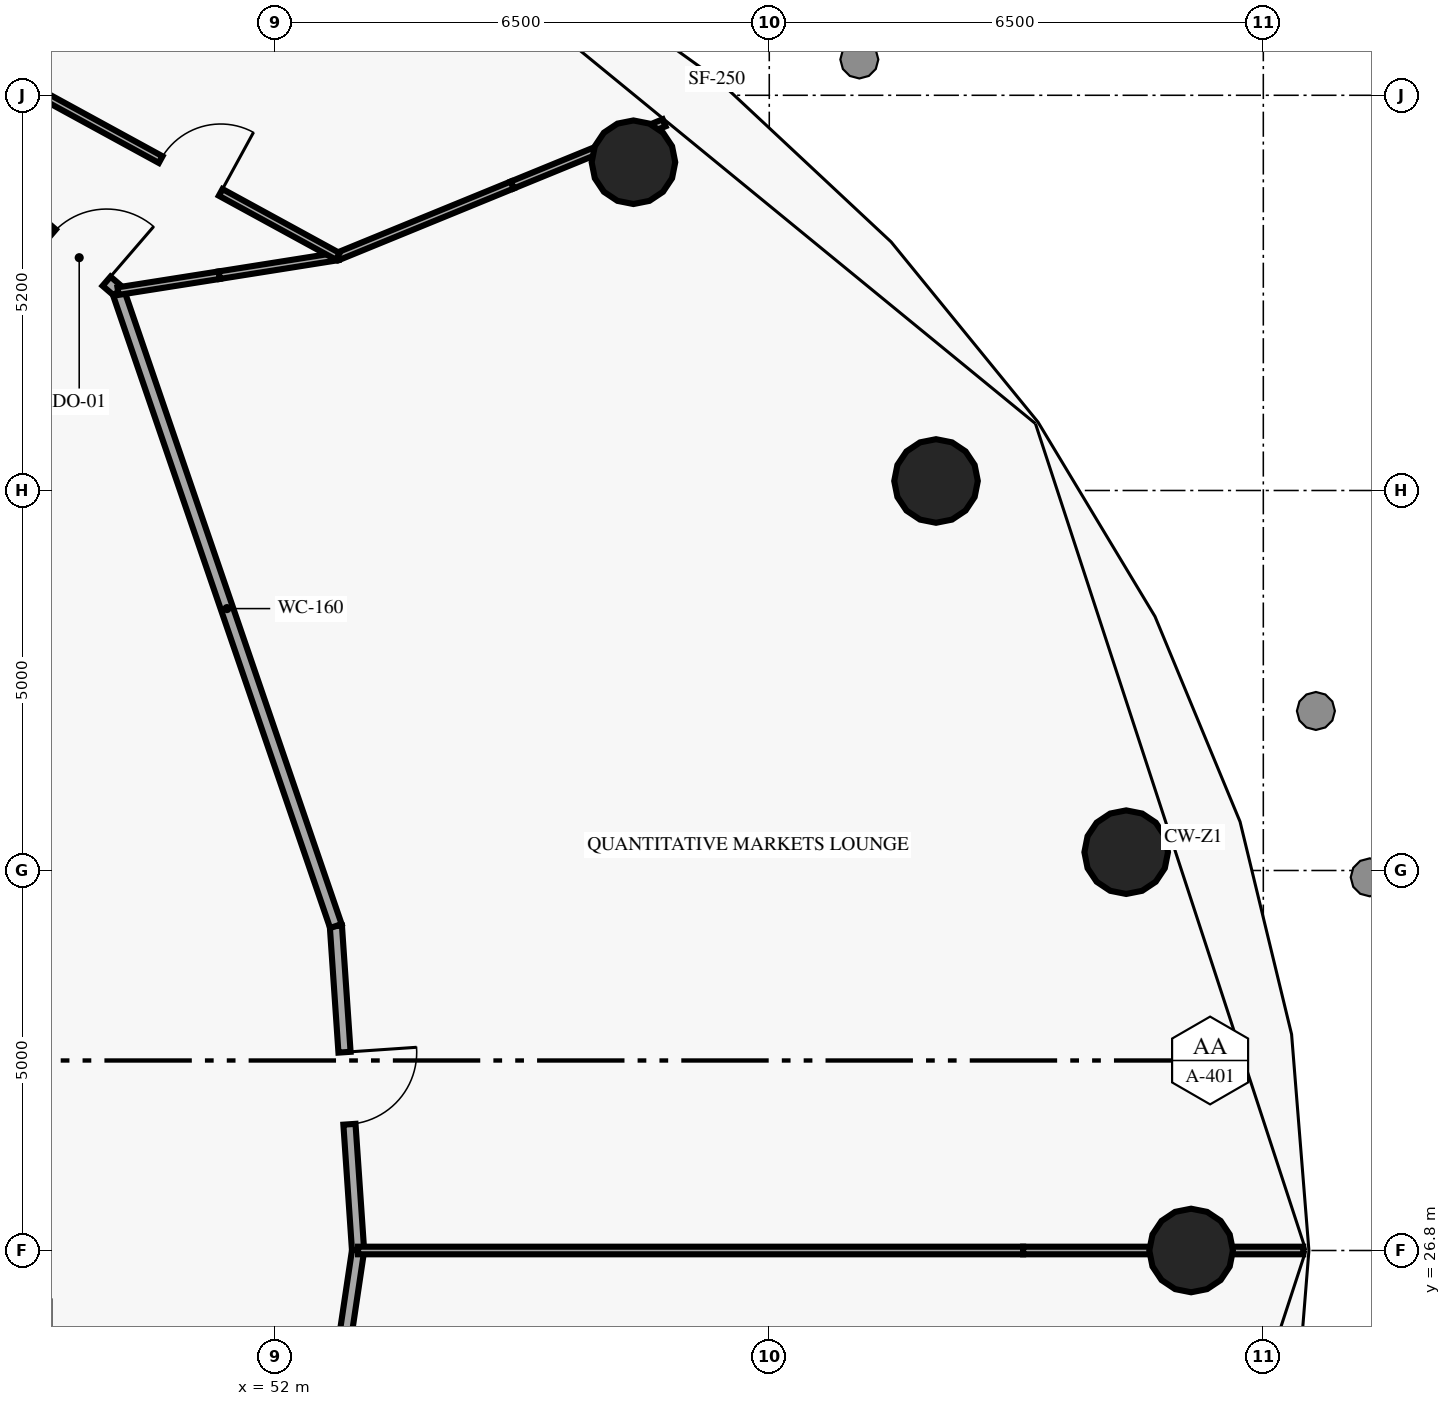
"""IFC4 building model, lengths in metres.
Left out: names, types, materials, properties, quantities, classifications, styles, units other than length and angle.
Written with IfcOpenShell. Run it as: python <this file> out.ifc"""

import sys

from ifc_helpers import new_model, si_unit, direction, frame, frame_2d, origin, origin_2d, place, context, subcontext, project, spatial, rectangle, circle, extrude, element, fill, save


model = new_model("IFC4")
c1 = context("Model", 3, precision=1e-05, world=origin(), true_north=direction((0.0, 1.0)))
c2 = subcontext(c1, "Body", "Model", "MODEL_VIEW")
j1 = project(units=[si_unit("LENGTHUNIT", "METRE"), si_unit("PLANEANGLEUNIT", "RADIAN")], contexts=[c1])
p1 = place(None, origin())
s1 = spatial("IfcSite", under=j1, at=p1, CompositionType="ELEMENT")
p2 = place(p1, origin())
s2 = spatial("IfcBuilding", under=s1, at=p2, CompositionType="ELEMENT")
p3 = place(p2, frame((0.0, 0.0, 65.55)))
s3 = spatial("IfcBuildingStorey", under=s2, at=p3, CompositionType="ELEMENT", Elevation=65.55)
for number, where, z_axis, x_axis in (
    (1, (64.05, 26.8, 0.0), (0.0, 0.0, 1.0), (1.0, 0.0, 0.0)),
    (2, (63.196, 32.041, 0.0), (0.0, 0.0, 1.0), (1.0, 0.0, 0.0)),
    (3, (60.694, 36.925, 0.0), (0.0, 0.0, 1.0), (1.0, 0.0, 0.0)),
    (4, (56.713, 41.119, 0.0), (0.0, 0.0, 1.0), (1.0, 0.0, 0.0)),
):
    element("IfcColumn", number, at=place(p3, frame(where, z_axis=z_axis, x_axis=x_axis)), inside=s3, PredefinedType="COLUMN", context=c2, shape_type="SweptSolid", body=[
        extrude(circle(Radius=0.55, at=origin_2d()), origin(), (0.0, 0.0, 1.0), 3.8),
    ])
p4 = place(p3, frame((52.798, 31.069, 0.0), z_axis=(0.0, 0.0, 1.0), x_axis=(0.068238144639, -0.99766906117, 0.0)))
e5 = element("IfcWall", 5, at=p4, inside=s3, PredefinedType="PARTITIONING", context=c2, shape_type="SweptSolid", body=[
    extrude(rectangle(XDim=4.279, YDim=0.16, at=frame_2d((2.14, 0.0))), origin(), (0.0, 0.0, 1.0), 3.8),
])
p5 = place(p4, frame((1.664, 0.0, 0.0)))
e6 = element("IfcOpeningElement", 6, at=p5, cuts=e5, PredefinedType="OPENING", context=c2, shape_type="SweptSolid", body=[
    extrude(rectangle(XDim=0.95, YDim=2.15, at=frame_2d((0.475, 1.075))), frame((0.0, 0.09, 0.0), z_axis=(0.0, -1.0, 0.0), x_axis=(1.0, 0.0, 0.0)), (0.0, 0.0, 1.0), 0.18),
])
p6 = place(p3, frame((52.798, 31.069, 0.0), z_axis=(0.0, 0.0, 1.0), x_axis=(-0.32452502426, 0.945877110744, 0.0)))
e7 = element("IfcWall", 7, at=p6, inside=s3, PredefinedType="PARTITIONING", context=c2, shape_type="SweptSolid", body=[
    extrude(rectangle(XDim=8.832, YDim=0.16, at=frame_2d((4.416, 0.0))), origin(), (0.0, 0.0, 1.0), 3.8),
])
p7 = place(p3, frame((46.703, 42.204, 0.0), z_axis=(0.0, 0.0, 1.0), x_axis=(0.757713718274, -0.652587098508, 0.0)))
e8 = element("IfcWall", 8, at=p7, inside=s3, PredefinedType="PARTITIONING", context=c2, shape_type="SweptSolid", body=[
    extrude(rectangle(XDim=4.261, YDim=0.16, at=frame_2d((2.131, 0.0))), origin(), (0.0, 0.0, 1.0), 3.8),
])
p8 = place(p7, frame((3.112, 0.0, 0.0)))
e9 = element("IfcOpeningElement", 9, at=p8, cuts=e8, PredefinedType="OPENING", context=c2, shape_type="SweptSolid", body=[
    extrude(rectangle(XDim=0.95, YDim=2.15, at=frame_2d((0.475, 1.075))), frame((0.0, 0.09, 0.0), z_axis=(0.0, -1.0, 0.0), x_axis=(1.0, 0.0, 0.0)), (0.0, 0.0, 1.0), 0.18),
])
p9 = place(p3, frame((51.818, 18.255, 0.0), z_axis=(0.0, 0.0, 1.0), x_axis=(0.147230717418, 0.989102176647, 0.0)))
e10 = element("IfcWall", 10, at=p9, inside=s3, PredefinedType="PARTITIONING", context=c2, shape_type="SweptSolid", body=[
    extrude(rectangle(XDim=8.639, YDim=0.16, at=frame_2d((4.32, 0.0))), origin(), (0.0, 0.0, 1.0), 3.8),
])
p10 = place(p3, frame((53.09, 26.8, 0.0), z_axis=(0.0, 0.0, 1.0), x_axis=(1.0, 0.0, 0.0)))
e11 = element("IfcWall", 11, at=p10, inside=s3, PredefinedType="MOVABLE", context=c2, shape_type="SweptSolid", body=[
    extrude(rectangle(XDim=8.75, YDim=0.1, at=frame_2d((4.375, 0.0))), origin(), (0.0, 0.0, 1.0), 3.8),
])
p11 = place(p3, frame((61.84, 26.8, 0.0), z_axis=(0.0, 0.0, 1.0), x_axis=(1.0, 0.0, 0.0)))
e12 = element("IfcWall", 12, at=p11, inside=s3, PredefinedType="MOVABLE", context=c2, shape_type="SweptSolid", body=[
    extrude(rectangle(XDim=2.216, YDim=0.1, at=frame_2d((1.108, 0.0))), origin(), (0.0, 0.0, 1.0), 2.79),
])
p12 = place(p3, frame((64.056, 26.8, 0.0), z_axis=(0.0, 0.0, 1.0), x_axis=(1.0, 0.0, 0.0)))
e13 = element("IfcWall", 13, at=p12, inside=s3, PredefinedType="MOVABLE", context=c2, shape_type="SweptSolid", body=[
    extrude(rectangle(XDim=1.469, YDim=0.1, at=frame_2d((0.734, 0.0))), origin(), (0.0, 0.0, 1.0), 3.8),
])
p13 = place(p3, frame((49.932, 39.423, 0.0), z_axis=(0.0, 0.0, 1.0), x_axis=(0.987804034071, 0.155702248772, 0.0)))
e14 = element("IfcWall", 14, at=p13, inside=s3, PredefinedType="MOVABLE", context=c2, shape_type="SweptSolid", body=[
    extrude(rectangle(XDim=1.348, YDim=0.1, at=frame_2d((0.674, 0.0))), origin(), (0.0, 0.0, 1.0), 3.8),
])
p14 = place(p3, frame((51.264, 39.633, 0.0), z_axis=(0.0, 0.0, 1.0), x_axis=(0.9877140387, 0.15627212725, 0.0)))
e15 = element("IfcWall", 15, at=p14, inside=s3, PredefinedType="MOVABLE", context=c2, shape_type="SweptSolid", body=[
    extrude(rectangle(XDim=1.579, YDim=0.1, at=frame_2d((0.79, 0.0))), origin(), (0.0, 0.0, 1.0), 3.02),
])
p15 = place(p3, frame((52.824, 39.88, 0.0), z_axis=(0.0, 0.0, 1.0), x_axis=(0.92535552939, 0.379100440817, 0.0)))
e16 = element("IfcWall", 16, at=p15, inside=s3, PredefinedType="MOVABLE", context=c2, shape_type="SweptSolid", body=[
    extrude(rectangle(XDim=2.48, YDim=0.1, at=frame_2d((1.24, 0.0))), origin(), (0.0, 0.0, 1.0), 3.02),
])
p16 = place(p3, frame((55.119, 40.82, 0.0), z_axis=(0.0, 0.0, 1.0), x_axis=(0.925467678062, 0.378826578875, 0.0)))
e17 = element("IfcWall", 17, at=p16, inside=s3, PredefinedType="MOVABLE", context=c2, shape_type="SweptSolid", body=[
    extrude(rectangle(XDim=2.159, YDim=0.1, at=frame_2d((1.08, 0.0))), origin(), (0.0, 0.0, 1.0), 3.8),
])
p17 = place(p3, frame((44.06, 44.668, 0.0), z_axis=(0.0, 0.0, 1.0), x_axis=(0.877568372218, -0.479451511712, 0.0)))
e18 = element("IfcWall", 18, at=p17, inside=s3, PredefinedType="MOVABLE", context=c2, shape_type="SweptSolid", body=[
    extrude(rectangle(XDim=9.987, YDim=0.1, at=frame_2d((4.993, 0.0))), origin(), (0.0, 0.0, 1.0), 3.8),
])
p18 = place(p17, frame((7.33, 0.0, 0.0)))
e19 = element("IfcOpeningElement", 19, at=p18, cuts=e18, PredefinedType="OPENING", context=c2, shape_type="SweptSolid", body=[
    extrude(rectangle(XDim=0.9, YDim=2.1, at=frame_2d((0.45, 1.05))), frame((0.0, 0.06, 0.0), z_axis=(0.0, -1.0, 0.0), x_axis=(1.0, 0.0, 0.0)), (0.0, 0.0, 1.0), 0.12),
])
p19 = place(p5, origin())
e20 = element("IfcDoor", 20, at=p19, inside=s3, OperationType="SINGLE_SWING_LEFT", PredefinedType="DOOR", context=c2, shape_type="SweptSolid", body=[
    extrude(rectangle(XDim=0.95, YDim=2.15, at=frame_2d((0.475, 1.075))), frame((0.0, 0.025, 0.0), z_axis=(0.0, -1.0, 0.0), x_axis=(1.0, 0.0, 0.0)), (0.0, 0.0, 1.0), 0.05),
])
fill(e6, e20)
p20 = place(p8, origin())
e21 = element("IfcDoor", 21, at=p20, inside=s3, OperationType="SINGLE_SWING_RIGHT", PredefinedType="DOOR", context=c2, shape_type="SweptSolid", body=[
    extrude(rectangle(XDim=0.95, YDim=2.15, at=frame_2d((0.475, 1.075))), frame((0.0, 0.025, 0.0), z_axis=(0.0, -1.0, 0.0), x_axis=(1.0, 0.0, 0.0)), (0.0, 0.0, 1.0), 0.05),
])
fill(e9, e21)
p21 = place(p18, origin())
e22 = element("IfcDoor", 22, at=p21, inside=s3, OperationType="SINGLE_SWING_RIGHT", PredefinedType="DOOR", context=c2, shape_type="SweptSolid", body=[
    extrude(rectangle(XDim=0.9, YDim=2.1, at=frame_2d((0.45, 1.05))), frame((0.0, 0.025, 0.0), z_axis=(0.0, -1.0, 0.0), x_axis=(1.0, 0.0, 0.0)), (0.0, 0.0, 1.0), 0.05),
])
fill(e19, e22)
save(model, sys.argv[1])
